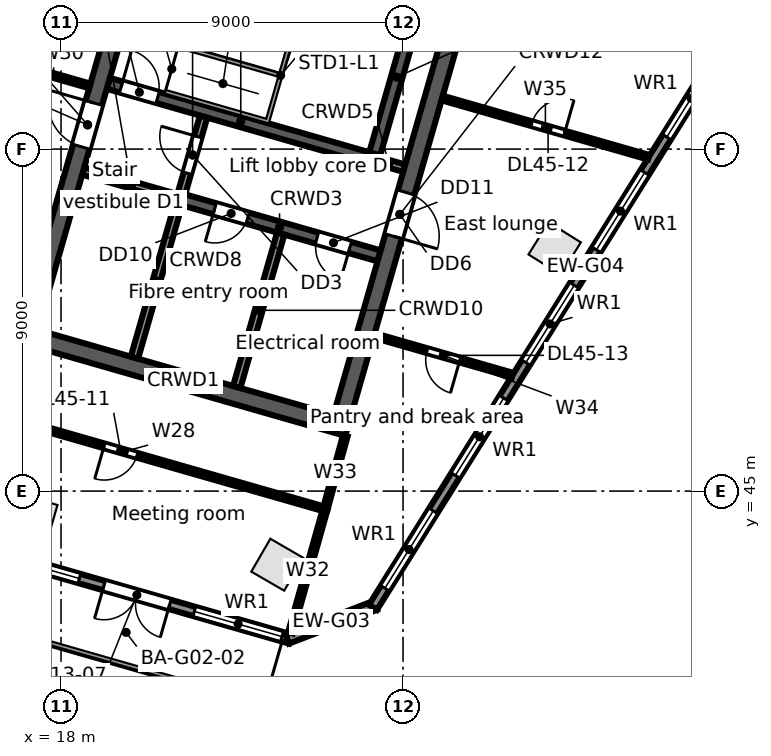
"""IFC4 building model, lengths in metres.
Left out: names, types, materials, properties, quantities, classifications, styles, units other than length and angle.
Written with IfcOpenShell. Run it as: python <this file> out.ifc"""

import sys

from ifc_helpers import new_model, si_unit, direction, frame, frame_2d, origin, origin_2d, place, context, subcontext, project, spatial, rectangle, extrude, element, fill, save


model = new_model("IFC4")
c1 = context("Model", 3, precision=1e-05, world=origin(), true_north=direction((0.0, 1.0)))
c2 = subcontext(c1, "Body", "Model", "MODEL_VIEW")
j1 = project(units=[si_unit("LENGTHUNIT", "METRE"), si_unit("PLANEANGLEUNIT", "RADIAN")], contexts=[c1])
p1 = place(None, origin())
s1 = spatial("IfcSite", under=j1, at=p1, CompositionType="ELEMENT")
p2 = place(p1, origin())
s2 = spatial("IfcBuilding", under=s1, at=p2, CompositionType="ELEMENT")
p3 = place(p2, frame((0.0, 0.0, 207.5)))
s3 = spatial("IfcBuildingStorey", under=s2, at=p3, CompositionType="ELEMENT", Elevation=207.5)
for number, where, z_axis, x_axis in (
    (1, (17.288, 44.291, 0.0), (0.0, 0.0, 1.0), (0.961, -0.276, 0.0)),
    (2, (23.69, 43.063, 0.0), (0.0, 0.0, 1.0), (-0.865, 0.501, 0.0)),
    (3, (30.99, 51.386, 0.0), (0.0, 0.0, 1.0), (0.53, 0.848, 0.0)),
):
    element("IfcColumn", number, at=place(p3, frame(where, z_axis=z_axis, x_axis=x_axis)), inside=s3, PredefinedType="COLUMN", context=c2, shape_type="SweptSolid", body=[
        extrude(rectangle(XDim=1.0, YDim=1.0, at=origin_2d()), origin(), (0.0, 0.0, 1.0), 3.9),
    ])
p4 = place(p3, frame((24.034, 41.108, 0.0), z_axis=(0.0, 0.0, 1.0), x_axis=(-0.96126060691, 0.275641153683, 0.0)))
e4 = element("IfcWall", 4, at=p4, inside=s3, PredefinedType="STANDARD", context=c2, shape_type="SweptSolid", body=[
    extrude(rectangle(XDim=24.951, YDim=0.25, at=frame_2d((12.475, 0.0))), origin(), (0.0, 0.0, 1.0), 3.62),
])
p5 = place(p4, frame((22.416, 0.0, 0.8)))
e5 = element("IfcOpeningElement", 5, at=p5, cuts=e4, PredefinedType="OPENING", context=c2, shape_type="SweptSolid", body=[
    extrude(rectangle(XDim=2.4, YDim=2.2, at=frame_2d((1.2, 1.1))), frame((0.0, 0.135, 0.0), z_axis=(0.0, -1.0, 0.0), x_axis=(1.0, 0.0, 0.0)), (0.0, 0.0, 1.0), 0.27),
])
p6 = place(p4, frame((19.643, 0.0, 0.8)))
e6 = element("IfcOpeningElement", 6, at=p6, cuts=e4, PredefinedType="OPENING", context=c2, shape_type="SweptSolid", body=[
    extrude(rectangle(XDim=2.4, YDim=2.2, at=frame_2d((1.2, 1.1))), frame((0.0, 0.135, 0.0), z_axis=(0.0, -1.0, 0.0), x_axis=(1.0, 0.0, 0.0)), (0.0, 0.0, 1.0), 0.27),
])
p7 = place(p4, frame((16.869, 0.0, 0.8)))
e7 = element("IfcOpeningElement", 7, at=p7, cuts=e4, PredefinedType="OPENING", context=c2, shape_type="SweptSolid", body=[
    extrude(rectangle(XDim=2.4, YDim=2.2, at=frame_2d((1.2, 1.1))), frame((0.0, 0.135, 0.0), z_axis=(0.0, -1.0, 0.0), x_axis=(1.0, 0.0, 0.0)), (0.0, 0.0, 1.0), 0.27),
])
p8 = place(p4, frame((14.096, 0.0, 0.8)))
e8 = element("IfcOpeningElement", 8, at=p8, cuts=e4, PredefinedType="OPENING", context=c2, shape_type="SweptSolid", body=[
    extrude(rectangle(XDim=2.4, YDim=2.2, at=frame_2d((1.2, 1.1))), frame((0.0, 0.135, 0.0), z_axis=(0.0, -1.0, 0.0), x_axis=(1.0, 0.0, 0.0)), (0.0, 0.0, 1.0), 0.27),
])
p9 = place(p4, frame((11.622, 0.0, 0.0)))
e9 = element("IfcOpeningElement", 9, at=p9, cuts=e4, PredefinedType="OPENING", context=c2, shape_type="SweptSolid", body=[
    extrude(rectangle(XDim=1.8, YDim=2.4, at=frame_2d((0.9, 1.2))), frame((0.0, 0.135, 0.0), z_axis=(0.0, -1.0, 0.0), x_axis=(1.0, 0.0, 0.0)), (0.0, 0.0, 1.0), 0.27),
])
p10 = place(p4, frame((8.549, 0.0, 0.8)))
e10 = element("IfcOpeningElement", 10, at=p10, cuts=e4, PredefinedType="OPENING", context=c2, shape_type="SweptSolid", body=[
    extrude(rectangle(XDim=2.4, YDim=2.2, at=frame_2d((1.2, 1.1))), frame((0.0, 0.135, 0.0), z_axis=(0.0, -1.0, 0.0), x_axis=(1.0, 0.0, 0.0)), (0.0, 0.0, 1.0), 0.27),
])
p11 = place(p4, frame((5.775, 0.0, 0.8)))
e11 = element("IfcOpeningElement", 11, at=p11, cuts=e4, PredefinedType="OPENING", context=c2, shape_type="SweptSolid", body=[
    extrude(rectangle(XDim=2.4, YDim=2.2, at=frame_2d((1.2, 1.1))), frame((0.0, 0.135, 0.0), z_axis=(0.0, -1.0, 0.0), x_axis=(1.0, 0.0, 0.0)), (0.0, 0.0, 1.0), 0.27),
])
p12 = place(p4, frame((3.302, 0.0, 0.0)))
e12 = element("IfcOpeningElement", 12, at=p12, cuts=e4, PredefinedType="OPENING", context=c2, shape_type="SweptSolid", body=[
    extrude(rectangle(XDim=1.8, YDim=2.4, at=frame_2d((0.9, 1.2))), frame((0.0, 0.135, 0.0), z_axis=(0.0, -1.0, 0.0), x_axis=(1.0, 0.0, 0.0)), (0.0, 0.0, 1.0), 0.27),
])
p13 = place(p4, frame((0.229, 0.0, 0.8)))
e13 = element("IfcOpeningElement", 13, at=p13, cuts=e4, PredefinedType="OPENING", context=c2, shape_type="SweptSolid", body=[
    extrude(rectangle(XDim=2.4, YDim=2.2, at=frame_2d((1.2, 1.1))), frame((0.0, 0.135, 0.0), z_axis=(0.0, -1.0, 0.0), x_axis=(1.0, 0.0, 0.0)), (0.0, 0.0, 1.0), 0.27),
])
p14 = place(p3, frame((26.27, 41.993, 0.0), z_axis=(0.0, 0.0, 1.0), x_axis=(-0.933573798066, -0.358385216722, 0.0)))
e14 = element("IfcWall", 14, at=p14, inside=s3, PredefinedType="STANDARD", context=c2, shape_type="SweptSolid", body=[
    extrude(rectangle(XDim=2.48, YDim=0.25, at=frame_2d((1.24, 0.0))), origin(), (0.0, 0.0, 1.0), 3.62),
])
p15 = place(p3, frame((37.392, 59.84, 0.0), z_axis=(0.0, 0.0, 1.0), x_axis=(-0.529919909431, -0.848047692992, 0.0)))
e15 = element("IfcWall", 15, at=p15, inside=s3, PredefinedType="STANDARD", context=c2, shape_type="SweptSolid", body=[
    extrude(rectangle(XDim=21.104, YDim=0.25, at=frame_2d((10.552, 0.0))), origin(), (0.0, 0.0, 1.0), 3.62),
])
p16 = place(p15, frame((18.112, 0.0, 0.8)))
e16 = element("IfcOpeningElement", 16, at=p16, cuts=e15, PredefinedType="OPENING", context=c2, shape_type="SweptSolid", body=[
    extrude(rectangle(XDim=2.4, YDim=2.2, at=frame_2d((1.2, 1.1))), frame((0.0, 0.135, 0.0), z_axis=(0.0, -1.0, 0.0), x_axis=(1.0, 0.0, 0.0)), (0.0, 0.0, 1.0), 0.27),
])
p17 = place(p15, frame((14.612, 0.0, 0.8)))
e17 = element("IfcOpeningElement", 17, at=p17, cuts=e15, PredefinedType="OPENING", context=c2, shape_type="SweptSolid", body=[
    extrude(rectangle(XDim=2.4, YDim=2.2, at=frame_2d((1.2, 1.1))), frame((0.0, 0.135, 0.0), z_axis=(0.0, -1.0, 0.0), x_axis=(1.0, 0.0, 0.0)), (0.0, 0.0, 1.0), 0.27),
])
p18 = place(p15, frame((11.112, 0.0, 0.8)))
e18 = element("IfcOpeningElement", 18, at=p18, cuts=e15, PredefinedType="OPENING", context=c2, shape_type="SweptSolid", body=[
    extrude(rectangle(XDim=2.4, YDim=2.2, at=frame_2d((1.2, 1.1))), frame((0.0, 0.135, 0.0), z_axis=(0.0, -1.0, 0.0), x_axis=(1.0, 0.0, 0.0)), (0.0, 0.0, 1.0), 0.27),
])
p19 = place(p15, frame((7.612, 0.0, 0.8)))
e19 = element("IfcOpeningElement", 19, at=p19, cuts=e15, PredefinedType="OPENING", context=c2, shape_type="SweptSolid", body=[
    extrude(rectangle(XDim=2.4, YDim=2.2, at=frame_2d((1.2, 1.1))), frame((0.0, 0.135, 0.0), z_axis=(0.0, -1.0, 0.0), x_axis=(1.0, 0.0, 0.0)), (0.0, 0.0, 1.0), 0.27),
])
p20 = place(p15, frame((4.112, 0.0, 0.8)))
e20 = element("IfcOpeningElement", 20, at=p20, cuts=e15, PredefinedType="OPENING", context=c2, shape_type="SweptSolid", body=[
    extrude(rectangle(XDim=2.4, YDim=2.2, at=frame_2d((1.2, 1.1))), frame((0.0, 0.135, 0.0), z_axis=(0.0, -1.0, 0.0), x_axis=(1.0, 0.0, 0.0)), (0.0, 0.0, 1.0), 0.27),
])
p21 = place(p15, frame((0.612, 0.0, 0.8)))
e21 = element("IfcOpeningElement", 21, at=p21, cuts=e15, PredefinedType="OPENING", context=c2, shape_type="SweptSolid", body=[
    extrude(rectangle(XDim=2.4, YDim=2.2, at=frame_2d((1.2, 1.1))), frame((0.0, 0.135, 0.0), z_axis=(0.0, -1.0, 0.0), x_axis=(1.0, 0.0, 0.0)), (0.0, 0.0, 1.0), 0.27),
])
p22 = place(p3, frame((16.89, 49.149, 0.0), z_axis=(0.0, 0.0, 1.0), x_axis=(0.96126248289, -0.275634611374, 0.0)))
e22 = element("IfcWall", 22, at=p22, inside=s3, PredefinedType="SOLIDWALL", context=c2, shape_type="SweptSolid", body=[
    extrude(rectangle(XDim=9.0, YDim=0.45, at=frame_2d((4.5, 0.0))), origin(), (0.0, 0.0, 1.0), 3.62),
])
p23 = place(p3, frame((18.583, 53.423, 0.0), z_axis=(0.0, 0.0, 1.0), x_axis=(0.961259287968, -0.275645753268, 0.0)))
e23 = element("IfcWall", 23, at=p23, inside=s3, PredefinedType="SOLIDWALL", context=c2, shape_type="SweptSolid", body=[
    extrude(rectangle(XDim=2.65, YDim=0.2, at=frame_2d((1.325, 0.0))), origin(), (0.0, 0.0, 1.0), 3.62),
])
p24 = place(p3, frame((21.131, 52.692, 0.0), z_axis=(0.0, 0.0, 1.0), x_axis=(0.961261488075, -0.275638080722, 0.0)))
e24 = element("IfcWall", 24, at=p24, inside=s3, PredefinedType="SOLIDWALL", context=c2, shape_type="SweptSolid", body=[
    extrude(rectangle(XDim=5.45, YDim=0.3, at=frame_2d((2.725, 0.0))), origin(), (0.0, 0.0, 1.0), 3.62),
])
p25 = place(p24, frame((0.95, 0.0, 0.0)))
e25 = element("IfcOpeningElement", 25, at=p25, cuts=e24, PredefinedType="OPENING", context=c2, shape_type="SweptSolid", body=[
    extrude(rectangle(XDim=0.9, YDim=2.1, at=frame_2d((0.45, 1.05))), frame((0.0, 0.16, 0.0), z_axis=(0.0, -1.0, 0.0), x_axis=(1.0, 0.0, 0.0)), (0.0, 0.0, 1.0), 0.32),
])
p26 = place(p24, frame((3.75, 0.0, 0.0)))
e26 = element("IfcOpeningElement", 26, at=p26, cuts=e24, PredefinedType="OPENING", context=c2, shape_type="SweptSolid", body=[
    extrude(rectangle(XDim=0.9, YDim=2.1, at=frame_2d((0.45, 1.05))), frame((0.0, 0.16, 0.0), z_axis=(0.0, -1.0, 0.0), x_axis=(1.0, 0.0, 0.0)), (0.0, 0.0, 1.0), 0.32),
])
p27 = place(p3, frame((19.245, 55.73, 0.0), z_axis=(0.0, 0.0, 1.0), x_axis=(0.961263007877, -0.275632780503, 0.0)))
e27 = element("IfcWall", 27, at=p27, inside=s3, PredefinedType="SOLIDWALL", context=c2, shape_type="SweptSolid", body=[
    extrude(rectangle(XDim=7.25, YDim=0.3, at=frame_2d((3.625, 0.0))), origin(), (0.0, 0.0, 1.0), 3.62),
])
p28 = place(p27, frame((0.35, 0.0, 0.0)))
e28 = element("IfcOpeningElement", 28, at=p28, cuts=e27, PredefinedType="OPENING", context=c2, shape_type="SweptSolid", body=[
    extrude(rectangle(XDim=1.0, YDim=2.1, at=frame_2d((0.5, 1.05))), frame((0.0, 0.16, 0.0), z_axis=(0.0, -1.0, 0.0), x_axis=(1.0, 0.0, 0.0)), (0.0, 0.0, 1.0), 0.32),
])
p29 = place(p3, frame((26.214, 53.732, 0.0), z_axis=(0.0, 0.0, 1.0), x_axis=(0.961241665642, -0.275707200184, 0.0)))
e29 = element("IfcWall", 29, at=p29, inside=s3, PredefinedType="SOLIDWALL", context=c2, shape_type="SweptSolid", body=[
    extrude(rectangle(XDim=0.85, YDim=0.2, at=frame_2d((0.425, 0.0))), origin(), (0.0, 0.0, 1.0), 3.62),
])
p30 = place(p3, frame((17.168, 49.303, 0.0), z_axis=(0.0, 0.0, 1.0), x_axis=(0.275638974822, 0.961261231695, 0.0)))
e30 = element("IfcWall", 30, at=p30, inside=s3, PredefinedType="SOLIDWALL", context=c2, shape_type="SweptSolid", body=[
    extrude(rectangle(XDim=11.1, YDim=0.45, at=frame_2d((5.55, 0.0))), origin(), (0.0, 0.0, 1.0), 3.62),
])
p31 = place(p30, frame((4.95, 0.0, 0.0)))
e31 = element("IfcOpeningElement", 31, at=p31, cuts=e30, PredefinedType="OPENING", context=c2, shape_type="SweptSolid", body=[
    extrude(rectangle(XDim=1.2, YDim=2.1, at=frame_2d((0.6, 1.05))), frame((0.0, 0.235, 0.0), z_axis=(0.0, -1.0, 0.0), x_axis=(1.0, 0.0, 0.0)), (0.0, 0.0, 1.0), 0.47),
])
p32 = place(p3, frame((19.932, 48.511, 0.0), z_axis=(0.0, 0.0, 1.0), x_axis=(0.275642273411, 0.961260285827, 0.0)))
e32 = element("IfcWall", 32, at=p32, inside=s3, PredefinedType="SOLIDWALL", context=c2, shape_type="SweptSolid", body=[
    extrude(rectangle(XDim=4.2, YDim=0.2, at=frame_2d((2.1, 0.0))), origin(), (0.0, 0.0, 1.0), 3.62),
])
p33 = place(p3, frame((21.172, 52.837, 0.0), z_axis=(0.0, 0.0, 1.0), x_axis=(0.275657676022, 0.961255868981, 0.0)))
e33 = element("IfcWall", 33, at=p33, inside=s3, PredefinedType="PARTITIONING", context=c2, shape_type="SweptSolid", body=[
    extrude(rectangle(XDim=2.1, YDim=0.2, at=frame_2d((1.05, 0.0))), origin(), (0.0, 0.0, 1.0), 3.62),
])
p34 = place(p33, frame((0.55, 0.0, 0.0)))
e34 = element("IfcOpeningElement", 34, at=p34, cuts=e33, PredefinedType="OPENING", context=c2, shape_type="SweptSolid", body=[
    extrude(rectangle(XDim=1.0, YDim=2.1, at=frame_2d((0.5, 1.05))), frame((0.0, 0.11, 0.0), z_axis=(0.0, -1.0, 0.0), x_axis=(1.0, 0.0, 0.0)), (0.0, 0.0, 1.0), 0.22),
])
p35 = place(p3, frame((22.623, 47.739, 0.0), z_axis=(0.0, 0.0, 1.0), x_axis=(0.275642273411, 0.961260285827, 0.0)))
e35 = element("IfcWall", 35, at=p35, inside=s3, PredefinedType="PARTITIONING", context=c2, shape_type="SweptSolid", body=[
    extrude(rectangle(XDim=4.2, YDim=0.2, at=frame_2d((2.1, 0.0))), origin(), (0.0, 0.0, 1.0), 3.62),
])
p36 = place(p3, frame((26.256, 53.876, 0.0), z_axis=(0.0, 0.0, 1.0), x_axis=(0.275588560745, 0.96127568636, 0.0)))
e36 = element("IfcWall", 36, at=p36, inside=s3, PredefinedType="SOLIDWALL", context=c2, shape_type="SweptSolid", body=[
    extrude(rectangle(XDim=4.2, YDim=0.3, at=frame_2d((2.1, 0.0))), origin(), (0.0, 0.0, 1.0), 3.62),
])
p37 = place(p3, frame((25.387, 46.947, 0.0), z_axis=(0.0, 0.0, 1.0), x_axis=(0.275638974822, 0.961261231695, 0.0)))
e37 = element("IfcWall", 37, at=p37, inside=s3, PredefinedType="SOLIDWALL", context=c2, shape_type="SweptSolid", body=[
    extrude(rectangle(XDim=11.1, YDim=0.45, at=frame_2d((5.55, 0.0))), origin(), (0.0, 0.0, 1.0), 3.62),
])
p38 = place(p37, frame((4.95, 0.0, 0.0)))
e38 = element("IfcOpeningElement", 38, at=p38, cuts=e37, PredefinedType="OPENING", context=c2, shape_type="SweptSolid", body=[
    extrude(rectangle(XDim=1.2, YDim=2.1, at=frame_2d((0.6, 1.05))), frame((0.0, 0.235, 0.0), z_axis=(0.0, -1.0, 0.0), x_axis=(1.0, 0.0, 0.0)), (0.0, 0.0, 1.0), 0.47),
])
p39 = place(p3, frame((14.377, 47.555, 0.0), z_axis=(0.0, 0.0, 1.0), x_axis=(0.961263044958, -0.275632651182, 0.0)))
e39 = element("IfcWall", 39, at=p39, inside=s3, PredefinedType="PARTITIONING", context=c2, shape_type="SweptSolid", body=[
    extrude(rectangle(XDim=11.0, YDim=0.125, at=frame_2d((5.5, 0.0))), origin(), (0.0, 0.0, 1.0), 2.9),
])
p40 = place(p39, frame((4.95, 0.0, 0.0)))
e40 = element("IfcOpeningElement", 40, at=p40, cuts=e39, PredefinedType="OPENING", context=c2, shape_type="SweptSolid", body=[
    extrude(rectangle(XDim=0.9, YDim=2.1, at=frame_2d((0.45, 1.05))), frame((0.0, 0.073, 0.0), z_axis=(0.0, -1.0, 0.0), x_axis=(1.0, 0.0, 0.0)), (0.0, 0.0, 1.0), 0.145),
])
p41 = place(p3, frame((16.857, 56.206, 0.0), z_axis=(0.0, 0.0, 1.0), x_axis=(0.961383985066, -0.275210525341, 0.0)))
e41 = element("IfcWall", 41, at=p41, inside=s3, PredefinedType="PARTITIONING", context=c2, shape_type="SweptSolid", body=[
    extrude(rectangle(XDim=1.977, YDim=0.125, at=frame_2d((0.988, 0.0))), origin(), (0.0, 0.0, 1.0), 3.62),
])
p42 = place(p3, frame((24.036, 41.27, 0.0), z_axis=(0.0, 0.0, 1.0), x_axis=(0.270787421954, 0.962639170256, 0.0)))
e42 = element("IfcWall", 42, at=p42, inside=s3, PredefinedType="PARTITIONING", context=c2, shape_type="SweptSolid", body=[
    extrude(rectangle(XDim=3.379, YDim=0.125, at=frame_2d((1.689, 0.0))), origin(), (0.0, 0.0, 1.0), 2.9),
])
p43 = place(p3, frame((24.951, 44.523, 0.0), z_axis=(0.0, 0.0, 1.0), x_axis=(0.264046927145, 0.964509834198, 0.0)))
e43 = element("IfcWall", 43, at=p43, inside=s3, PredefinedType="PARTITIONING", context=c2, shape_type="SweptSolid", body=[
    extrude(rectangle(XDim=2.0, YDim=0.125, at=frame_2d((1.0, 0.0))), origin(), (0.0, 0.0, 1.0), 2.9),
])
p44 = place(p3, frame((26.237, 49.096, 0.0), z_axis=(0.0, 0.0, 1.0), x_axis=(0.961285271066, -0.275555126304, 0.0)))
e44 = element("IfcWall", 44, at=p44, inside=s3, PredefinedType="PARTITIONING", context=c2, shape_type="SweptSolid", body=[
    extrude(rectangle(XDim=3.789, YDim=0.125, at=frame_2d((1.894, 0.0))), origin(), (0.0, 0.0, 1.0), 2.9),
])
p45 = place(p44, frame((1.45, 0.0, 0.0)))
e45 = element("IfcOpeningElement", 45, at=p45, cuts=e44, PredefinedType="OPENING", context=c2, shape_type="SweptSolid", body=[
    extrude(rectangle(XDim=0.9, YDim=2.1, at=frame_2d((0.45, 1.05))), frame((0.0, 0.073, 0.0), z_axis=(0.0, -1.0, 0.0), x_axis=(1.0, 0.0, 0.0)), (0.0, 0.0, 1.0), 0.145),
])
p46 = place(p3, frame((28.029, 55.344, 0.0), z_axis=(0.0, 0.0, 1.0), x_axis=(0.961249621014, -0.275679462603, 0.0)))
e46 = element("IfcWall", 46, at=p46, inside=s3, PredefinedType="PARTITIONING", context=c2, shape_type="SweptSolid", body=[
    extrude(rectangle(XDim=5.652, YDim=0.125, at=frame_2d((2.826, 0.0))), origin(), (0.0, 0.0, 1.0), 2.988),
])
p47 = place(p46, frame((2.45, 0.0, 0.0)))
e47 = element("IfcOpeningElement", 47, at=p47, cuts=e46, PredefinedType="OPENING", context=c2, shape_type="SweptSolid", body=[
    extrude(rectangle(XDim=0.9, YDim=2.1, at=frame_2d((0.45, 1.05))), frame((0.0, 0.073, 0.0), z_axis=(0.0, -1.0, 0.0), x_axis=(1.0, 0.0, 0.0)), (0.0, 0.0, 1.0), 0.145),
])
p48 = place(p11, origin())
e48 = element("IfcWindow", 48, at=p48, inside=s3, PartitioningType="SINGLE_PANEL", PredefinedType="WINDOW", context=c2, shape_type="SweptSolid", body=[
    extrude(rectangle(XDim=2.4, YDim=2.2, at=frame_2d((1.2, 1.1))), frame((0.0, 0.03, 0.0), z_axis=(0.0, -1.0, 0.0), x_axis=(1.0, 0.0, 0.0)), (0.0, 0.0, 1.0), 0.06),
])
fill(e11, e48)
p49 = place(p12, origin())
e49 = element("IfcDoor", 49, at=p49, inside=s3, OperationType="DOUBLE_DOOR_SINGLE_SWING", PredefinedType="DOOR", context=c2, shape_type="SweptSolid", body=[
    extrude(rectangle(XDim=1.8, YDim=2.4, at=frame_2d((0.9, 1.2))), frame((0.0, 0.025, 0.0), z_axis=(0.0, -1.0, 0.0), x_axis=(1.0, 0.0, 0.0)), (0.0, 0.0, 1.0), 0.05),
])
fill(e12, e49)
p50 = place(p13, origin())
e50 = element("IfcWindow", 50, at=p50, inside=s3, PartitioningType="SINGLE_PANEL", PredefinedType="WINDOW", context=c2, shape_type="SweptSolid", body=[
    extrude(rectangle(XDim=2.4, YDim=2.2, at=frame_2d((1.2, 1.1))), frame((0.0, 0.03, 0.0), z_axis=(0.0, -1.0, 0.0), x_axis=(1.0, 0.0, 0.0)), (0.0, 0.0, 1.0), 0.06),
])
fill(e13, e50)
p51 = place(p16, origin())
e51 = element("IfcWindow", 51, at=p51, inside=s3, PartitioningType="SINGLE_PANEL", PredefinedType="WINDOW", context=c2, shape_type="SweptSolid", body=[
    extrude(rectangle(XDim=2.4, YDim=2.2, at=frame_2d((1.2, 1.1))), frame((0.0, 0.03, 0.0), z_axis=(0.0, -1.0, 0.0), x_axis=(1.0, 0.0, 0.0)), (0.0, 0.0, 1.0), 0.06),
])
fill(e16, e51)
p52 = place(p17, origin())
e52 = element("IfcWindow", 52, at=p52, inside=s3, PartitioningType="SINGLE_PANEL", PredefinedType="WINDOW", context=c2, shape_type="SweptSolid", body=[
    extrude(rectangle(XDim=2.4, YDim=2.2, at=frame_2d((1.2, 1.1))), frame((0.0, 0.03, 0.0), z_axis=(0.0, -1.0, 0.0), x_axis=(1.0, 0.0, 0.0)), (0.0, 0.0, 1.0), 0.06),
])
fill(e17, e52)
p53 = place(p18, origin())
e53 = element("IfcWindow", 53, at=p53, inside=s3, PartitioningType="SINGLE_PANEL", PredefinedType="WINDOW", context=c2, shape_type="SweptSolid", body=[
    extrude(rectangle(XDim=2.4, YDim=2.2, at=frame_2d((1.2, 1.1))), frame((0.0, 0.03, 0.0), z_axis=(0.0, -1.0, 0.0), x_axis=(1.0, 0.0, 0.0)), (0.0, 0.0, 1.0), 0.06),
])
fill(e18, e53)
p54 = place(p19, origin())
e54 = element("IfcWindow", 54, at=p54, inside=s3, PartitioningType="SINGLE_PANEL", PredefinedType="WINDOW", context=c2, shape_type="SweptSolid", body=[
    extrude(rectangle(XDim=2.4, YDim=2.2, at=frame_2d((1.2, 1.1))), frame((0.0, 0.03, 0.0), z_axis=(0.0, -1.0, 0.0), x_axis=(1.0, 0.0, 0.0)), (0.0, 0.0, 1.0), 0.06),
])
fill(e19, e54)
p55 = place(p20, origin())
e55 = element("IfcWindow", 55, at=p55, inside=s3, PartitioningType="SINGLE_PANEL", PredefinedType="WINDOW", context=c2, shape_type="SweptSolid", body=[
    extrude(rectangle(XDim=2.4, YDim=2.2, at=frame_2d((1.2, 1.1))), frame((0.0, 0.03, 0.0), z_axis=(0.0, -1.0, 0.0), x_axis=(1.0, 0.0, 0.0)), (0.0, 0.0, 1.0), 0.06),
])
fill(e20, e55)
p56 = place(p28, origin())
e56 = element("IfcDoor", 56, at=p56, inside=s3, OperationType="SINGLE_SWING_LEFT", PredefinedType="DOOR", context=c2, shape_type="SweptSolid", body=[
    extrude(rectangle(XDim=1.0, YDim=2.1, at=frame_2d((0.5, 1.05))), frame((0.0, 0.025, 0.0), z_axis=(0.0, -1.0, 0.0), x_axis=(1.0, 0.0, 0.0)), (0.0, 0.0, 1.0), 0.05),
])
fill(e28, e56)
p57 = place(p34, origin())
e57 = element("IfcDoor", 57, at=p57, inside=s3, OperationType="SINGLE_SWING_RIGHT", PredefinedType="DOOR", context=c2, shape_type="SweptSolid", body=[
    extrude(rectangle(XDim=1.0, YDim=2.1, at=frame_2d((0.5, 1.05))), frame((0.0, 0.025, 0.0), z_axis=(0.0, -1.0, 0.0), x_axis=(1.0, 0.0, 0.0)), (0.0, 0.0, 1.0), 0.05),
])
fill(e34, e57)
p58 = place(p31, origin())
e58 = element("IfcDoor", 58, at=p58, inside=s3, OperationType="SINGLE_SWING_RIGHT", PredefinedType="DOOR", context=c2, shape_type="SweptSolid", body=[
    extrude(rectangle(XDim=1.2, YDim=2.1, at=frame_2d((0.6, 1.05))), frame((0.0, 0.025, 0.0), z_axis=(0.0, -1.0, 0.0), x_axis=(1.0, 0.0, 0.0)), (0.0, 0.0, 1.0), 0.05),
])
fill(e31, e58)
p59 = place(p38, frame((1.2, 0.0, 0.0), z_axis=(0.0, 0.0, 1.0), x_axis=(-1.0, 0.0, 0.0)))
e59 = element("IfcDoor", 59, at=p59, inside=s3, OperationType="SINGLE_SWING_RIGHT", PredefinedType="DOOR", context=c2, shape_type="SweptSolid", body=[
    extrude(rectangle(XDim=1.2, YDim=2.1, at=frame_2d((0.6, 1.05))), frame((0.0, 0.025, 0.0), z_axis=(0.0, -1.0, 0.0), x_axis=(1.0, 0.0, 0.0)), (0.0, 0.0, 1.0), 0.05),
])
fill(e38, e59)
p60 = place(p25, frame((0.9, 0.0, 0.0), z_axis=(0.0, 0.0, 1.0), x_axis=(-1.0, 0.0, 0.0)))
e60 = element("IfcDoor", 60, at=p60, inside=s3, OperationType="SINGLE_SWING_RIGHT", PredefinedType="DOOR", context=c2, shape_type="SweptSolid", body=[
    extrude(rectangle(XDim=0.9, YDim=2.1, at=frame_2d((0.45, 1.05))), frame((0.0, 0.025, 0.0), z_axis=(0.0, -1.0, 0.0), x_axis=(1.0, 0.0, 0.0)), (0.0, 0.0, 1.0), 0.05),
])
fill(e25, e60)
p61 = place(p26, frame((0.9, 0.0, 0.0), z_axis=(0.0, 0.0, 1.0), x_axis=(-1.0, 0.0, 0.0)))
e61 = element("IfcDoor", 61, at=p61, inside=s3, OperationType="SINGLE_SWING_LEFT", PredefinedType="DOOR", context=c2, shape_type="SweptSolid", body=[
    extrude(rectangle(XDim=0.9, YDim=2.1, at=frame_2d((0.45, 1.05))), frame((0.0, 0.025, 0.0), z_axis=(0.0, -1.0, 0.0), x_axis=(1.0, 0.0, 0.0)), (0.0, 0.0, 1.0), 0.05),
])
fill(e26, e61)
p62 = place(p40, frame((0.9, 0.0, 0.0), z_axis=(0.0, 0.0, 1.0), x_axis=(-1.0, 0.0, 0.0)))
e62 = element("IfcDoor", 62, at=p62, inside=s3, OperationType="SINGLE_SWING_RIGHT", PredefinedType="DOOR", context=c2, shape_type="SweptSolid", body=[
    extrude(rectangle(XDim=0.9, YDim=2.1, at=frame_2d((0.45, 1.05))), frame((0.0, 0.025, 0.0), z_axis=(0.0, -1.0, 0.0), x_axis=(1.0, 0.0, 0.0)), (0.0, 0.0, 1.0), 0.05),
])
fill(e40, e62)
p63 = place(p47, origin())
e63 = element("IfcDoor", 63, at=p63, inside=s3, OperationType="SINGLE_SWING_RIGHT", PredefinedType="DOOR", context=c2, shape_type="SweptSolid", body=[
    extrude(rectangle(XDim=0.9, YDim=2.1, at=frame_2d((0.45, 1.05))), frame((0.0, 0.025, 0.0), z_axis=(0.0, -1.0, 0.0), x_axis=(1.0, 0.0, 0.0)), (0.0, 0.0, 1.0), 0.05),
])
fill(e47, e63)
p64 = place(p45, frame((0.9, 0.0, 0.0), z_axis=(0.0, 0.0, 1.0), x_axis=(-1.0, 0.0, 0.0)))
e64 = element("IfcDoor", 64, at=p64, inside=s3, OperationType="SINGLE_SWING_LEFT", PredefinedType="DOOR", context=c2, shape_type="SweptSolid", body=[
    extrude(rectangle(XDim=0.9, YDim=2.1, at=frame_2d((0.45, 1.05))), frame((0.0, 0.025, 0.0), z_axis=(0.0, -1.0, 0.0), x_axis=(1.0, 0.0, 0.0)), (0.0, 0.0, 1.0), 0.05),
])
fill(e45, e64)
save(model, sys.argv[1])
